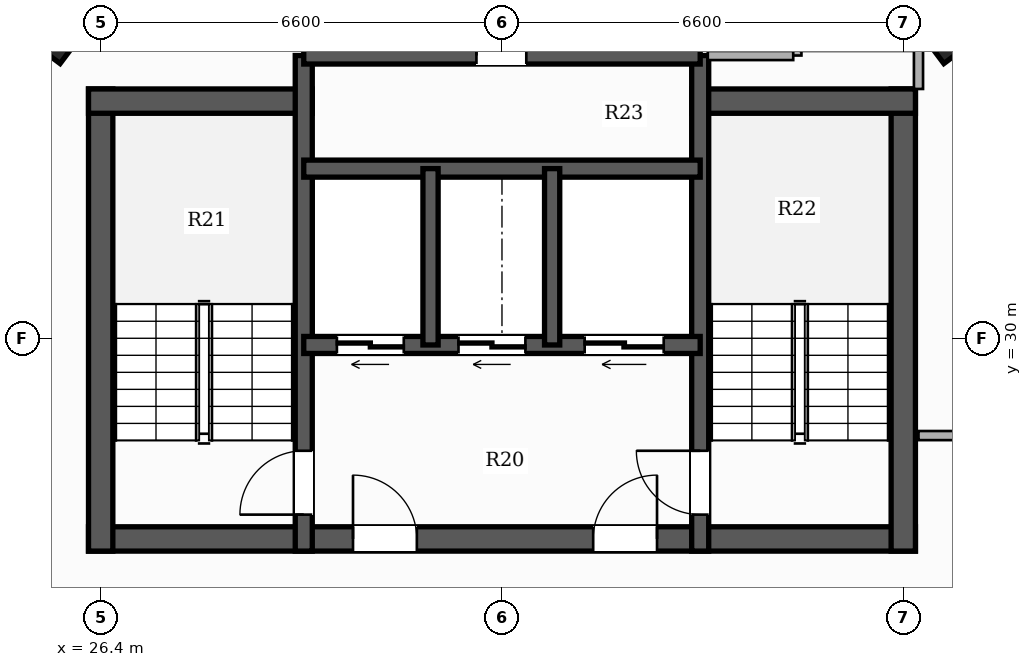
"""IFC4 building model, lengths in metres.
Left out: names, types, materials, properties, quantities, classifications, styles, units other than length and angle.
Written with IfcOpenShell. Run it as: python <this file> out.ifc"""

import sys

from ifc_helpers import new_model, si_unit, direction, frame, frame_2d, origin, origin_2d, place, context, subcontext, project, spatial, rectangle, hollow_rectangle, extrude, element, fill, save


model = new_model("IFC4")
c1 = context("Model", 3, precision=1e-05, world=origin(), true_north=direction((0.0, 1.0)))
c2 = subcontext(c1, "Body", "Model", "MODEL_VIEW")
j1 = project(units=[si_unit("LENGTHUNIT", "METRE"), si_unit("PLANEANGLEUNIT", "RADIAN")], contexts=[c1])
p1 = place(None, origin())
s1 = spatial("IfcSite", under=j1, at=p1, CompositionType="ELEMENT")
p2 = place(p1, origin())
s2 = spatial("IfcBuilding", under=s1, at=p2, CompositionType="ELEMENT")
p3 = place(p2, frame((0.0, 0.0, 110.0)))
s3 = spatial("IfcBuildingStorey", under=s2, at=p3, CompositionType="ELEMENT", Elevation=110.0)
p4 = place(p3, frame((26.2, 26.7, 0.0), z_axis=(0.0, 0.0, 1.0), x_axis=(1.0, 0.0, 0.0)))
e1 = element("IfcWall", 1, at=p4, inside=s3, PredefinedType="SHEAR", context=c2, shape_type="SweptSolid", body=[
    extrude(rectangle(XDim=13.6, YDim=0.4, at=frame_2d((6.8, 0.0))), origin(), (0.0, 0.0, 1.0), 3.3),
])
p5 = place(p4, frame((4.35, 0.0, 0.0)))
e2 = element("IfcOpeningElement", 2, at=p5, cuts=e1, PredefinedType="OPENING", context=c2, shape_type="SweptSolid", body=[
    extrude(rectangle(XDim=1.05, YDim=2.15, at=frame_2d((0.525, 1.075))), frame((0.0, 0.21, 0.0), z_axis=(0.0, -1.0, 0.0), x_axis=(1.0, 0.0, 0.0)), (0.0, 0.0, 1.0), 0.42),
])
p6 = place(p4, frame((8.3, 0.0, 0.0)))
e3 = element("IfcOpeningElement", 3, at=p6, cuts=e1, PredefinedType="OPENING", context=c2, shape_type="SweptSolid", body=[
    extrude(rectangle(XDim=1.05, YDim=2.15, at=frame_2d((0.525, 1.075))), frame((0.0, 0.21, 0.0), z_axis=(0.0, -1.0, 0.0), x_axis=(1.0, 0.0, 0.0)), (0.0, 0.0, 1.0), 0.42),
])
p7 = place(p3, frame((26.4, 26.5, 0.0), z_axis=(0.0, 0.0, 1.0), x_axis=(0.0, 1.0, 0.0)))
e4 = element("IfcWall", 4, at=p7, inside=s3, PredefinedType="SHEAR", context=c2, shape_type="SweptSolid", body=[
    extrude(rectangle(XDim=7.6, YDim=0.4, at=frame_2d((3.8, 0.0))), origin(), (0.0, 0.0, 1.0), 3.3),
])
p8 = place(p3, frame((26.2, 33.9, 0.0), z_axis=(0.0, 0.0, 1.0), x_axis=(1.0, 0.0, 0.0)))
e5 = element("IfcWall", 5, at=p8, inside=s3, PredefinedType="SHEAR", context=c2, shape_type="SweptSolid", body=[
    extrude(rectangle(XDim=3.68, YDim=0.4, at=frame_2d((1.84, 0.0))), origin(), (0.0, 0.0, 1.0), 3.3),
])
p9 = place(p3, frame((39.6, 26.5, 0.0), z_axis=(0.0, 0.0, 1.0), x_axis=(0.0, 1.0, 0.0)))
e6 = element("IfcWall", 6, at=p9, inside=s3, PredefinedType="SHEAR", context=c2, shape_type="SweptSolid", body=[
    extrude(rectangle(XDim=7.6, YDim=0.4, at=frame_2d((3.8, 0.0))), origin(), (0.0, 0.0, 1.0), 3.3),
])
p10 = place(p3, frame((36.12, 33.9, 0.0), z_axis=(0.0, 0.0, 1.0), x_axis=(1.0, 0.0, 0.0)))
e7 = element("IfcWall", 7, at=p10, inside=s3, PredefinedType="SHEAR", context=c2, shape_type="SweptSolid", body=[
    extrude(rectangle(XDim=3.68, YDim=0.4, at=frame_2d((1.84, 0.0))), origin(), (0.0, 0.0, 1.0), 3.3),
])
p11 = place(p3, frame((29.74, 26.5, 0.0), z_axis=(0.0, 0.0, 1.0), x_axis=(0.0, 1.0, 0.0)))
e8 = element("IfcWall", 8, at=p11, inside=s3, PredefinedType="SHEAR", context=c2, shape_type="SweptSolid", body=[
    extrude(rectangle(XDim=8.15, YDim=0.28, at=frame_2d((4.075, 0.0))), origin(), (0.0, 0.0, 1.0), 3.3),
])
p12 = place(p11, frame((0.6, 0.0, 0.0)))
e9 = element("IfcOpeningElement", 9, at=p12, cuts=e8, PredefinedType="OPENING", context=c2, shape_type="SweptSolid", body=[
    extrude(rectangle(XDim=1.05, YDim=2.15, at=frame_2d((0.525, 1.075))), frame((0.0, 0.15, 0.0), z_axis=(0.0, -1.0, 0.0), x_axis=(1.0, 0.0, 0.0)), (0.0, 0.0, 1.0), 0.3),
])
p13 = place(p3, frame((36.26, 26.5, 0.0), z_axis=(0.0, 0.0, 1.0), x_axis=(0.0, 1.0, 0.0)))
e10 = element("IfcWall", 10, at=p13, inside=s3, PredefinedType="SHEAR", context=c2, shape_type="SweptSolid", body=[
    extrude(rectangle(XDim=8.15, YDim=0.28, at=frame_2d((4.075, 0.0))), origin(), (0.0, 0.0, 1.0), 3.3),
])
p14 = place(p13, frame((0.6, 0.0, 0.0)))
e11 = element("IfcOpeningElement", 11, at=p14, cuts=e10, PredefinedType="OPENING", context=c2, shape_type="SweptSolid", body=[
    extrude(rectangle(XDim=1.05, YDim=2.15, at=frame_2d((0.525, 1.075))), frame((0.0, 0.15, 0.0), z_axis=(0.0, -1.0, 0.0), x_axis=(1.0, 0.0, 0.0)), (0.0, 0.0, 1.0), 0.3),
])
p15 = place(p3, frame((36.26, 29.89, 0.0), z_axis=(0.0, 0.0, 1.0), x_axis=(-1.0, 0.0, 0.0)))
e12 = element("IfcWall", 12, at=p15, inside=s3, PredefinedType="SHEAR", context=c2, shape_type="SweptSolid", body=[
    extrude(rectangle(XDim=6.52, YDim=0.28, at=frame_2d((3.26, 0.0))), origin(), (0.0, 0.0, 1.0), 3.3),
])
p16 = place(p15, frame((4.875, 0.0, 0.0)))
e13 = element("IfcOpeningElement", 13, at=p16, cuts=e12, PredefinedType="OPENING", context=c2, shape_type="SweptSolid", body=[
    extrude(rectangle(XDim=1.1, YDim=2.2, at=frame_2d((0.55, 1.1))), frame((0.0, 0.15, 0.0), z_axis=(0.0, -1.0, 0.0), x_axis=(1.0, 0.0, 0.0)), (0.0, 0.0, 1.0), 0.3),
])
p17 = place(p15, frame((2.875, 0.0, 0.0)))
e14 = element("IfcOpeningElement", 14, at=p17, cuts=e12, PredefinedType="OPENING", context=c2, shape_type="SweptSolid", body=[
    extrude(rectangle(XDim=1.1, YDim=2.2, at=frame_2d((0.55, 1.1))), frame((0.0, 0.15, 0.0), z_axis=(0.0, -1.0, 0.0), x_axis=(1.0, 0.0, 0.0)), (0.0, 0.0, 1.0), 0.3),
])
p18 = place(p15, frame((0.6, 0.0, 0.0)))
e15 = element("IfcOpeningElement", 15, at=p18, cuts=e12, PredefinedType="OPENING", context=c2, shape_type="SweptSolid", body=[
    extrude(rectangle(XDim=1.3, YDim=2.2, at=frame_2d((0.65, 1.1))), frame((0.0, 0.15, 0.0), z_axis=(0.0, -1.0, 0.0), x_axis=(1.0, 0.0, 0.0)), (0.0, 0.0, 1.0), 0.3),
])
p19 = place(p3, frame((29.74, 32.79, 0.0), z_axis=(0.0, 0.0, 1.0), x_axis=(1.0, 0.0, 0.0)))
e16 = element("IfcWall", 16, at=p19, inside=s3, PredefinedType="SHEAR", context=c2, shape_type="SweptSolid", body=[
    extrude(rectangle(XDim=6.52, YDim=0.28, at=frame_2d((3.26, 0.0))), origin(), (0.0, 0.0, 1.0), 3.3),
])
for number, where, z_axis, x_axis in (
    (17, (31.825, 29.89, 0.0), (0.0, 0.0, 1.0), (0.0, 1.0, 0.0)),
    (18, (33.825, 29.89, 0.0), (0.0, 0.0, 1.0), (0.0, 1.0, 0.0)),
):
    element("IfcWall", number, at=place(p3, frame(where, z_axis=z_axis, x_axis=x_axis)), inside=s3, PredefinedType="SHEAR", context=c2, shape_type="SweptSolid", body=[
        extrude(rectangle(XDim=2.9, YDim=0.25, at=frame_2d((1.45, 0.0))), origin(), (0.0, 0.0, 1.0), 3.3),
    ])
p20 = place(p3, frame((29.74, 34.65, 0.0), z_axis=(0.0, 0.0, 1.0), x_axis=(1.0, 0.0, 0.0)))
e19 = element("IfcWall", 19, at=p20, inside=s3, PredefinedType="SHEAR", context=c2, shape_type="SweptSolid", body=[
    extrude(rectangle(XDim=6.52, YDim=0.28, at=frame_2d((3.26, 0.0))), origin(), (0.0, 0.0, 1.0), 3.3),
])
p21 = place(p20, frame((2.84, 0.0, 0.0)))
e20 = element("IfcOpeningElement", 20, at=p21, cuts=e19, PredefinedType="OPENING", context=c2, shape_type="SweptSolid", body=[
    extrude(rectangle(XDim=0.82, YDim=2.1, at=frame_2d((0.41, 1.05))), frame((0.0, 0.15, 0.0), z_axis=(0.0, -1.0, 0.0), x_axis=(1.0, 0.0, 0.0)), (0.0, 0.0, 1.0), 0.3),
])
for number, where, z_axis, x_axis in (
    (21, (25.648, 35.113, 0.0), (0.0, 0.0, 1.0), (0.6, 0.8, 0.0)),
    (22, (40.352, 35.113, 0.0), (0.0, 0.0, 1.0), (-0.6, 0.8, 0.0)),
):
    element("IfcColumn", number, at=place(p3, frame(where, z_axis=z_axis, x_axis=x_axis)), inside=s3, PredefinedType="COLUMN", context=c2, shape_type="SweptSolid", body=[
        extrude(hollow_rectangle(XDim=0.85, YDim=0.85, WallThickness=0.028, at=origin_2d()), origin(), (0.0, 0.0, 1.0), 3.3),
    ])
p22 = place(p3, frame((37.85, 34.65, 0.0), z_axis=(0.0, 0.0, 1.0), x_axis=(0.0, 1.0, 0.0)))
e23 = element("IfcWall", 23, at=p22, inside=s3, PredefinedType="PARTITIONING", context=c2, shape_type="SweptSolid", body=[
    extrude(rectangle(XDim=2.26, YDim=0.15, at=frame_2d((1.13, 0.0))), origin(), (0.0, 0.0, 1.0), 3.06),
])
p23 = place(p3, frame((36.385, 34.65, 0.0), z_axis=(0.0, 0.0, 1.0), x_axis=(1.0, 0.0, 0.0)))
e24 = element("IfcWall", 24, at=p23, inside=s3, PredefinedType="PARTITIONING", context=c2, shape_type="SweptSolid", body=[
    extrude(rectangle(XDim=1.405, YDim=0.15, at=frame_2d((0.703, 0.0))), origin(), (0.0, 0.0, 1.0), 2.425),
])
p24 = place(p3, frame((39.85, 28.4, 0.0), z_axis=(0.0, 0.0, 1.0), x_axis=(1.0, 0.0, 0.0)))
e25 = element("IfcWall", 25, at=p24, inside=s3, PredefinedType="PARTITIONING", context=c2, shape_type="SweptSolid", body=[
    extrude(rectangle(XDim=2.5, YDim=0.15, at=frame_2d((1.25, 0.0))), origin(), (0.0, 0.0, 1.0), 2.721),
])
p25 = place(p3, frame((39.85, 34.74, 0.0), z_axis=(0.0, 0.0, 1.0), x_axis=(0.0, -1.0, 0.0)))
e26 = element("IfcWall", 26, at=p25, inside=s3, PredefinedType="PARTITIONING", context=c2, shape_type="SweptSolid", body=[
    extrude(rectangle(XDim=0.64, YDim=0.15, at=frame_2d((0.32, 0.0))), origin(), (0.0, 0.0, 1.0), 2.721),
])
p26 = place(p12, origin())
e27 = element("IfcDoor", 27, at=p26, inside=s3, OperationType="SINGLE_SWING_LEFT", PredefinedType="DOOR", context=c2, shape_type="SweptSolid", body=[
    extrude(rectangle(XDim=1.05, YDim=2.15, at=frame_2d((0.525, 1.075))), frame((0.0, 0.025, 0.0), z_axis=(0.0, -1.0, 0.0), x_axis=(1.0, 0.0, 0.0)), (0.0, 0.0, 1.0), 0.05),
])
fill(e9, e27)
p27 = place(p14, origin())
e28 = element("IfcDoor", 28, at=p27, inside=s3, OperationType="SINGLE_SWING_RIGHT", PredefinedType="DOOR", context=c2, shape_type="SweptSolid", body=[
    extrude(rectangle(XDim=1.05, YDim=2.15, at=frame_2d((0.525, 1.075))), frame((0.0, 0.025, 0.0), z_axis=(0.0, -1.0, 0.0), x_axis=(1.0, 0.0, 0.0)), (0.0, 0.0, 1.0), 0.05),
])
fill(e11, e28)
p28 = place(p5, origin())
e29 = element("IfcDoor", 29, at=p28, inside=s3, OperationType="SINGLE_SWING_LEFT", PredefinedType="DOOR", context=c2, shape_type="SweptSolid", body=[
    extrude(rectangle(XDim=1.05, YDim=2.15, at=frame_2d((0.525, 1.075))), frame((0.0, 0.025, 0.0), z_axis=(0.0, -1.0, 0.0), x_axis=(1.0, 0.0, 0.0)), (0.0, 0.0, 1.0), 0.05),
])
fill(e2, e29)
p29 = place(p6, origin())
e30 = element("IfcDoor", 30, at=p29, inside=s3, OperationType="SINGLE_SWING_RIGHT", PredefinedType="DOOR", context=c2, shape_type="SweptSolid", body=[
    extrude(rectangle(XDim=1.05, YDim=2.15, at=frame_2d((0.525, 1.075))), frame((0.0, 0.025, 0.0), z_axis=(0.0, -1.0, 0.0), x_axis=(1.0, 0.0, 0.0)), (0.0, 0.0, 1.0), 0.05),
])
fill(e3, e30)
p30 = place(p16, origin())
e31 = element("IfcDoor", 31, at=p30, inside=s3, OperationType="DOUBLE_DOOR_SLIDING", PredefinedType="DOOR", context=c2, shape_type="SweptSolid", body=[
    extrude(rectangle(XDim=1.1, YDim=2.2, at=frame_2d((0.55, 1.1))), frame((0.0, 0.025, 0.0), z_axis=(0.0, -1.0, 0.0), x_axis=(1.0, 0.0, 0.0)), (0.0, 0.0, 1.0), 0.05),
])
fill(e13, e31)
p31 = place(p17, origin())
e32 = element("IfcDoor", 32, at=p31, inside=s3, OperationType="DOUBLE_DOOR_SLIDING", PredefinedType="DOOR", context=c2, shape_type="SweptSolid", body=[
    extrude(rectangle(XDim=1.1, YDim=2.2, at=frame_2d((0.55, 1.1))), frame((0.0, 0.025, 0.0), z_axis=(0.0, -1.0, 0.0), x_axis=(1.0, 0.0, 0.0)), (0.0, 0.0, 1.0), 0.05),
])
fill(e14, e32)
p32 = place(p18, origin())
e33 = element("IfcDoor", 33, at=p32, inside=s3, OperationType="DOUBLE_DOOR_SLIDING", PredefinedType="DOOR", context=c2, shape_type="SweptSolid", body=[
    extrude(rectangle(XDim=1.3, YDim=2.2, at=frame_2d((0.65, 1.1))), frame((0.0, 0.025, 0.0), z_axis=(0.0, -1.0, 0.0), x_axis=(1.0, 0.0, 0.0)), (0.0, 0.0, 1.0), 0.05),
])
fill(e15, e33)
p33 = place(p21, origin())
e34 = element("IfcDoor", 34, at=p33, inside=s3, OperationType="SINGLE_SWING_LEFT", PredefinedType="DOOR", context=c2, shape_type="SweptSolid", body=[
    extrude(rectangle(XDim=0.82, YDim=2.1, at=frame_2d((0.41, 1.05))), frame((0.0, 0.025, 0.0), z_axis=(0.0, -1.0, 0.0), x_axis=(1.0, 0.0, 0.0)), (0.0, 0.0, 1.0), 0.05),
])
fill(e20, e34)
save(model, sys.argv[1])
